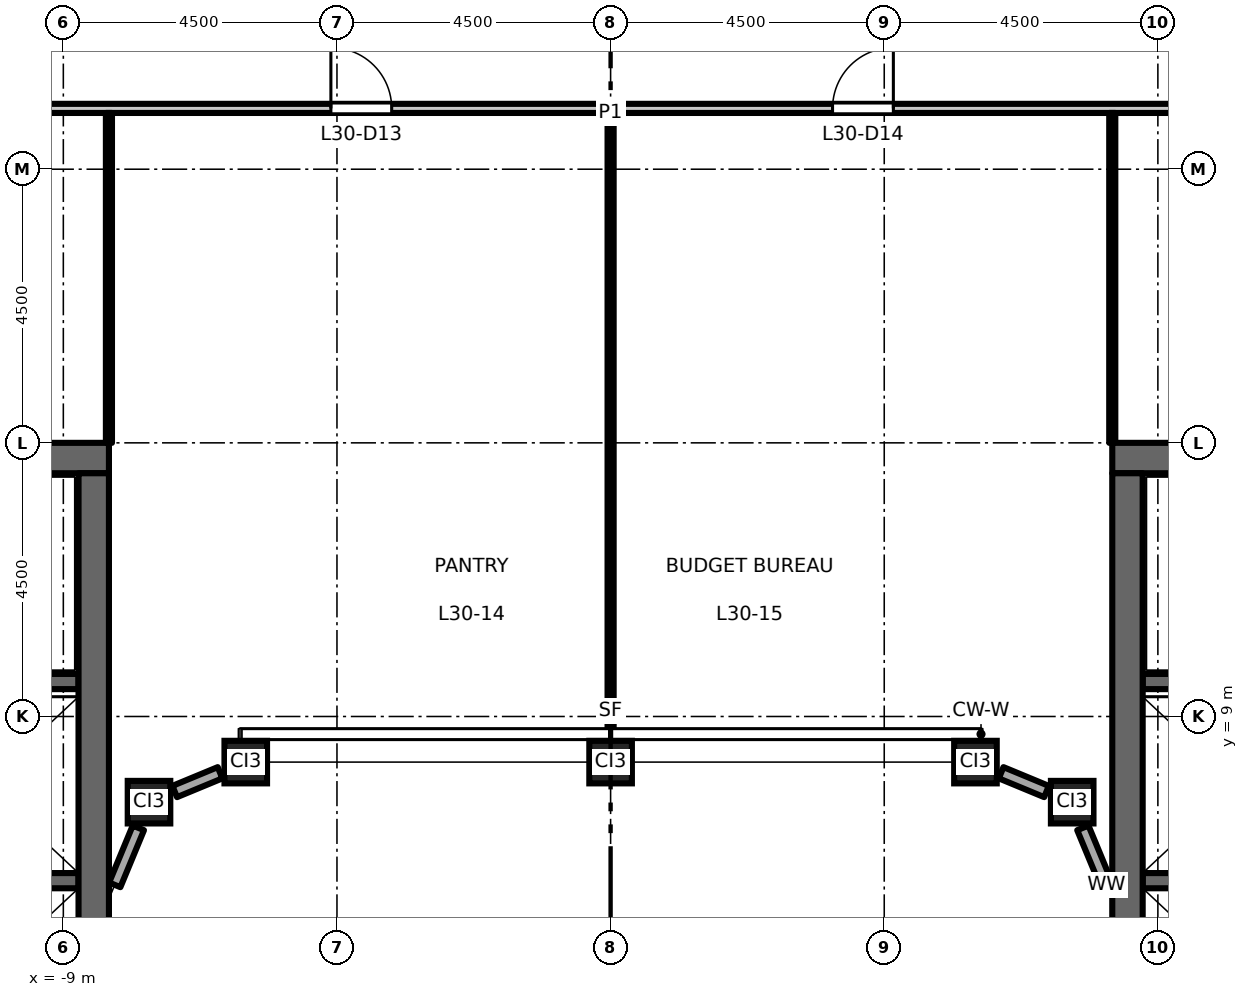
"""IFC4 building model, lengths in metres.
Left out: names, types, materials, properties, quantities, classifications, styles, units other than length and angle.
Written with IfcOpenShell. Run it as: python <this file> out.ifc"""

import sys

from ifc_helpers import new_model, si_unit, direction, frame, frame_2d, origin, origin_2d, place, context, subcontext, project, spatial, rectangle, hollow_rectangle, extrude, element, fill, save


model = new_model("IFC4")
c1 = context("Model", 3, precision=1e-05, world=origin(), true_north=direction((0.0, 1.0)))
c2 = subcontext(c1, "Body", "Model", "MODEL_VIEW")
j1 = project(units=[si_unit("LENGTHUNIT", "METRE"), si_unit("PLANEANGLEUNIT", "RADIAN")], contexts=[c1])
p1 = place(None, origin())
s1 = spatial("IfcSite", under=j1, at=p1, CompositionType="ELEMENT")
p2 = place(p1, origin())
s2 = spatial("IfcBuilding", under=s1, at=p2, CompositionType="ELEMENT")
p3 = place(p2, frame((0.0, 0.0, 140.7)))
s3 = spatial("IfcBuildingStorey", under=s2, at=p3, CompositionType="ELEMENT", Elevation=140.7)
for number, where, z_axis, x_axis in (
    (1, (-7.591, 7.591, 0.0), (0.0, 0.0, 1.0), (1.0, 0.0, 0.0)),
    (2, (-6.0, 8.25, 0.0), (0.0, 0.0, 1.0), (1.0, 0.0, 0.0)),
    (3, (0.0, 8.25, 0.0), (0.0, 0.0, 1.0), (1.0, 0.0, 0.0)),
    (4, (6.0, 8.25, 0.0), (0.0, 0.0, 1.0), (1.0, 0.0, 0.0)),
    (5, (7.591, 7.591, 0.0), (0.0, 0.0, 1.0), (1.0, 0.0, 0.0)),
):
    element("IfcColumn", number, at=place(p3, frame(where, z_axis=z_axis, x_axis=x_axis)), inside=s3, PredefinedType="COLUMN", context=c2, shape_type="SweptSolid", body=[
        extrude(hollow_rectangle(XDim=0.7, YDim=0.7, WallThickness=0.04, at=origin_2d()), origin(), (0.0, 0.0, 1.0), 4.5),
    ])
p4 = place(p3, frame((-8.75, 6.3, 0.0), z_axis=(0.0, 0.0, 1.0), x_axis=(-1.0, 0.0, 0.0)))
e6 = element("IfcWall", 6, at=p4, inside=s3, PredefinedType="SHEAR", context=c2, shape_type="SweptSolid", body=[
    extrude(rectangle(XDim=3.1, YDim=0.25, at=frame_2d((1.55, 0.0))), origin(), (0.0, 0.0, 1.0), 4.35),
])
p5 = place(p3, frame((-8.75, 9.575, 0.0), z_axis=(0.0, 0.0, 1.0), x_axis=(-1.0, 0.0, 0.0)))
e7 = element("IfcWall", 7, at=p5, inside=s3, PredefinedType="SHEAR", context=c2, shape_type="SweptSolid", body=[
    extrude(rectangle(XDim=8.0, YDim=0.25, at=frame_2d((4.0, 0.0))), origin(), (0.0, 0.0, 1.0), 4.35),
])
p6 = place(p5, frame((6.65, 0.0, 0.0)))
e8 = element("IfcOpeningElement", 8, at=p6, cuts=e7, PredefinedType="OPENING", context=c2, shape_type="SweptSolid", body=[
    extrude(rectangle(XDim=1.1, YDim=2.1, at=frame_2d((0.55, 1.05))), frame((0.0, 0.135, 0.0), z_axis=(0.0, -1.0, 0.0), x_axis=(1.0, 0.0, 0.0)), (0.0, 0.0, 1.0), 0.27),
])
p7 = place(p3, frame((-8.25, 13.25, 0.0), z_axis=(0.0, 0.0, 1.0), x_axis=(-1.0, 0.0, 0.0)))
e9 = element("IfcWall", 9, at=p7, inside=s3, PredefinedType="SHEAR", context=c2, shape_type="SweptSolid", body=[
    extrude(rectangle(XDim=13.5, YDim=0.5, at=frame_2d((6.75, 0.0))), origin(), (0.0, 0.0, 1.0), 4.35),
])
p8 = place(p3, frame((-8.5, -13.0, 0.0), z_axis=(0.0, 0.0, 1.0), x_axis=(0.0, 1.0, 0.0)))
e10 = element("IfcWall", 10, at=p8, inside=s3, PredefinedType="SHEAR", context=c2, shape_type="SweptSolid", body=[
    extrude(rectangle(XDim=26.0, YDim=0.5, at=frame_2d((13.0, 0.0))), origin(), (0.0, 0.0, 1.0), 4.35),
])
p9 = place(p3, frame((8.75, 6.3, 0.0), z_axis=(0.0, 0.0, 1.0), x_axis=(1.0, 0.0, 0.0)))
e11 = element("IfcWall", 11, at=p9, inside=s3, PredefinedType="SHEAR", context=c2, shape_type="SweptSolid", body=[
    extrude(rectangle(XDim=3.1, YDim=0.25, at=frame_2d((1.55, 0.0))), origin(), (0.0, 0.0, 1.0), 4.35),
])
p10 = place(p3, frame((8.75, 9.575, 0.0), z_axis=(0.0, 0.0, 1.0), x_axis=(1.0, 0.0, 0.0)))
e12 = element("IfcWall", 12, at=p10, inside=s3, PredefinedType="SHEAR", context=c2, shape_type="SweptSolid", body=[
    extrude(rectangle(XDim=8.0, YDim=0.25, at=frame_2d((4.0, 0.0))), origin(), (0.0, 0.0, 1.0), 4.35),
])
p11 = place(p10, frame((6.65, 0.0, 0.0)))
e13 = element("IfcOpeningElement", 13, at=p11, cuts=e12, PredefinedType="OPENING", context=c2, shape_type="SweptSolid", body=[
    extrude(rectangle(XDim=1.1, YDim=2.1, at=frame_2d((0.55, 1.05))), frame((0.0, 0.135, 0.0), z_axis=(0.0, -1.0, 0.0), x_axis=(1.0, 0.0, 0.0)), (0.0, 0.0, 1.0), 0.27),
])
p12 = place(p3, frame((8.25, 13.25, 0.0), z_axis=(0.0, 0.0, 1.0), x_axis=(1.0, 0.0, 0.0)))
e14 = element("IfcWall", 14, at=p12, inside=s3, PredefinedType="SHEAR", context=c2, shape_type="SweptSolid", body=[
    extrude(rectangle(XDim=13.5, YDim=0.5, at=frame_2d((6.75, 0.0))), origin(), (0.0, 0.0, 1.0), 4.35),
])
p13 = place(p3, frame((8.5, -13.0, 0.0), z_axis=(0.0, 0.0, 1.0), x_axis=(0.0, 1.0, 0.0)))
e15 = element("IfcWall", 15, at=p13, inside=s3, PredefinedType="SHEAR", context=c2, shape_type="SweptSolid", body=[
    extrude(rectangle(XDim=26.0, YDim=0.5, at=frame_2d((13.0, 0.0))), origin(), (0.0, 0.0, 1.0), 4.35),
])
p14 = place(p3, frame((8.154, 6.231, 0.0), z_axis=(0.0, 0.0, 1.0), x_axis=(-0.382769662028, 0.923843810301, 0.0)))
e16 = element("IfcWall", 16, at=p14, inside=s3, PredefinedType="STANDARD", context=c2, shape_type="SweptSolid", body=[
    extrude(rectangle(XDim=1.015, YDim=0.2, at=frame_2d((0.507, 0.0))), origin(), (0.0, 0.0, 1.0), 3.826),
])
for number, where, z_axis, x_axis in (
    (17, (7.168, 7.766, 0.0), (0.0, 0.0, 1.0), (-0.924, 0.383, 0.0)),
    (18, (-6.423, 8.075, 0.0), (0.0, 0.0, 1.0), (-0.924, -0.383, 0.0)),
):
    element("IfcWall", number, at=place(p3, frame(where, z_axis=z_axis, x_axis=x_axis)), inside=s3, PredefinedType="STANDARD", context=c2, shape_type="SweptSolid", body=[
        extrude(rectangle(XDim=0.807, YDim=0.2, at=frame_2d((0.404, 0.0))), origin(), (0.0, 0.0, 1.0), 3.826),
    ])
p15 = place(p3, frame((-7.766, 7.168, 0.0), z_axis=(0.0, 0.0, 1.0), x_axis=(-0.382769662028, -0.923843810301, 0.0)))
e19 = element("IfcWall", 19, at=p15, inside=s3, PredefinedType="STANDARD", context=c2, shape_type="SweptSolid", body=[
    extrude(rectangle(XDim=1.015, YDim=0.2, at=frame_2d((0.507, 0.0))), origin(), (0.0, 0.0, 1.0), 3.826),
])
p16 = place(p3, frame((-21.825, 19.0, 0.0), z_axis=(0.0, 0.0, 1.0), x_axis=(1.0, 0.0, 0.0)))
e20 = element("IfcWall", 20, at=p16, inside=s3, PredefinedType="PARTITIONING", context=c2, shape_type="SweptSolid", body=[
    extrude(rectangle(XDim=43.65, YDim=0.15, at=frame_2d((21.825, 0.0))), origin(), (0.0, 0.0, 1.0), 4.35),
])
p17 = place(p16, frame((17.225, 0.0, 0.0)))
e21 = element("IfcOpeningElement", 21, at=p17, cuts=e20, PredefinedType="OPENING", context=c2, shape_type="SweptSolid", body=[
    extrude(rectangle(XDim=1.0, YDim=2.1, at=frame_2d((0.5, 1.05))), frame((0.0, 0.085, 0.0), z_axis=(0.0, -1.0, 0.0), x_axis=(1.0, 0.0, 0.0)), (0.0, 0.0, 1.0), 0.17),
])
p18 = place(p16, frame((25.475, 0.0, 0.0)))
e22 = element("IfcOpeningElement", 22, at=p18, cuts=e20, PredefinedType="OPENING", context=c2, shape_type="SweptSolid", body=[
    extrude(rectangle(XDim=1.0, YDim=2.1, at=frame_2d((0.5, 1.05))), frame((0.0, 0.085, 0.0), z_axis=(0.0, -1.0, 0.0), x_axis=(1.0, 0.0, 0.0)), (0.0, 0.0, 1.0), 0.17),
])
p19 = place(p16, frame((6.225, 0.0, 0.0)))
e23 = element("IfcOpeningElement", 23, at=p19, cuts=e20, PredefinedType="OPENING", context=c2, shape_type="SweptSolid", body=[
    extrude(rectangle(XDim=1.0, YDim=2.1, at=frame_2d((0.5, 1.05))), frame((0.0, 0.085, 0.0), z_axis=(0.0, -1.0, 0.0), x_axis=(1.0, 0.0, 0.0)), (0.0, 0.0, 1.0), 0.17),
])
p20 = place(p16, frame((36.225, 0.0, 0.0)))
e24 = element("IfcOpeningElement", 24, at=p20, cuts=e20, PredefinedType="OPENING", context=c2, shape_type="SweptSolid", body=[
    extrude(rectangle(XDim=1.0, YDim=2.1, at=frame_2d((0.5, 1.05))), frame((0.0, 0.085, 0.0), z_axis=(0.0, -1.0, 0.0), x_axis=(1.0, 0.0, 0.0)), (0.0, 0.0, 1.0), 0.17),
])
p21 = place(p3, frame((-8.25, 13.5, 0.0), z_axis=(0.0, 0.0, 1.0), x_axis=(0.0, 1.0, 0.0)))
e25 = element("IfcWall", 25, at=p21, inside=s3, PredefinedType="PARTITIONING", context=c2, shape_type="SweptSolid", body=[
    extrude(rectangle(XDim=5.425, YDim=0.1, at=frame_2d((2.712, 0.0))), origin(), (0.0, 0.0, 1.0), 4.35),
])
p22 = place(p3, frame((0.0, 8.65, 0.0), z_axis=(0.0, 0.0, 1.0), x_axis=(0.0, 1.0, 0.0)))
e26 = element("IfcWall", 26, at=p22, inside=s3, PredefinedType="PARTITIONING", context=c2, shape_type="SweptSolid", body=[
    extrude(rectangle(XDim=10.275, YDim=0.1, at=frame_2d((5.138, 0.0))), origin(), (0.0, 0.0, 1.0), 3.45),
])
p23 = place(p3, frame((8.25, 13.5, 0.0), z_axis=(0.0, 0.0, 1.0), x_axis=(0.0, 1.0, 0.0)))
e27 = element("IfcWall", 27, at=p23, inside=s3, PredefinedType="PARTITIONING", context=c2, shape_type="SweptSolid", body=[
    extrude(rectangle(XDim=5.425, YDim=0.1, at=frame_2d((2.712, 0.0))), origin(), (0.0, 0.0, 1.0), 4.35),
])
p24 = place(p17, origin())
e28 = element("IfcDoor", 28, at=p24, inside=s3, OperationType="SINGLE_SWING_LEFT", PredefinedType="DOOR", context=c2, shape_type="SweptSolid", body=[
    extrude(rectangle(XDim=1.0, YDim=2.1, at=frame_2d((0.5, 1.05))), frame((0.0, 0.025, 0.0), z_axis=(0.0, -1.0, 0.0), x_axis=(1.0, 0.0, 0.0)), (0.0, 0.0, 1.0), 0.05),
])
fill(e21, e28)
p25 = place(p18, origin())
e29 = element("IfcDoor", 29, at=p25, inside=s3, OperationType="SINGLE_SWING_RIGHT", PredefinedType="DOOR", context=c2, shape_type="SweptSolid", body=[
    extrude(rectangle(XDim=1.0, YDim=2.1, at=frame_2d((0.5, 1.05))), frame((0.0, 0.025, 0.0), z_axis=(0.0, -1.0, 0.0), x_axis=(1.0, 0.0, 0.0)), (0.0, 0.0, 1.0), 0.05),
])
fill(e22, e29)
save(model, sys.argv[1])
